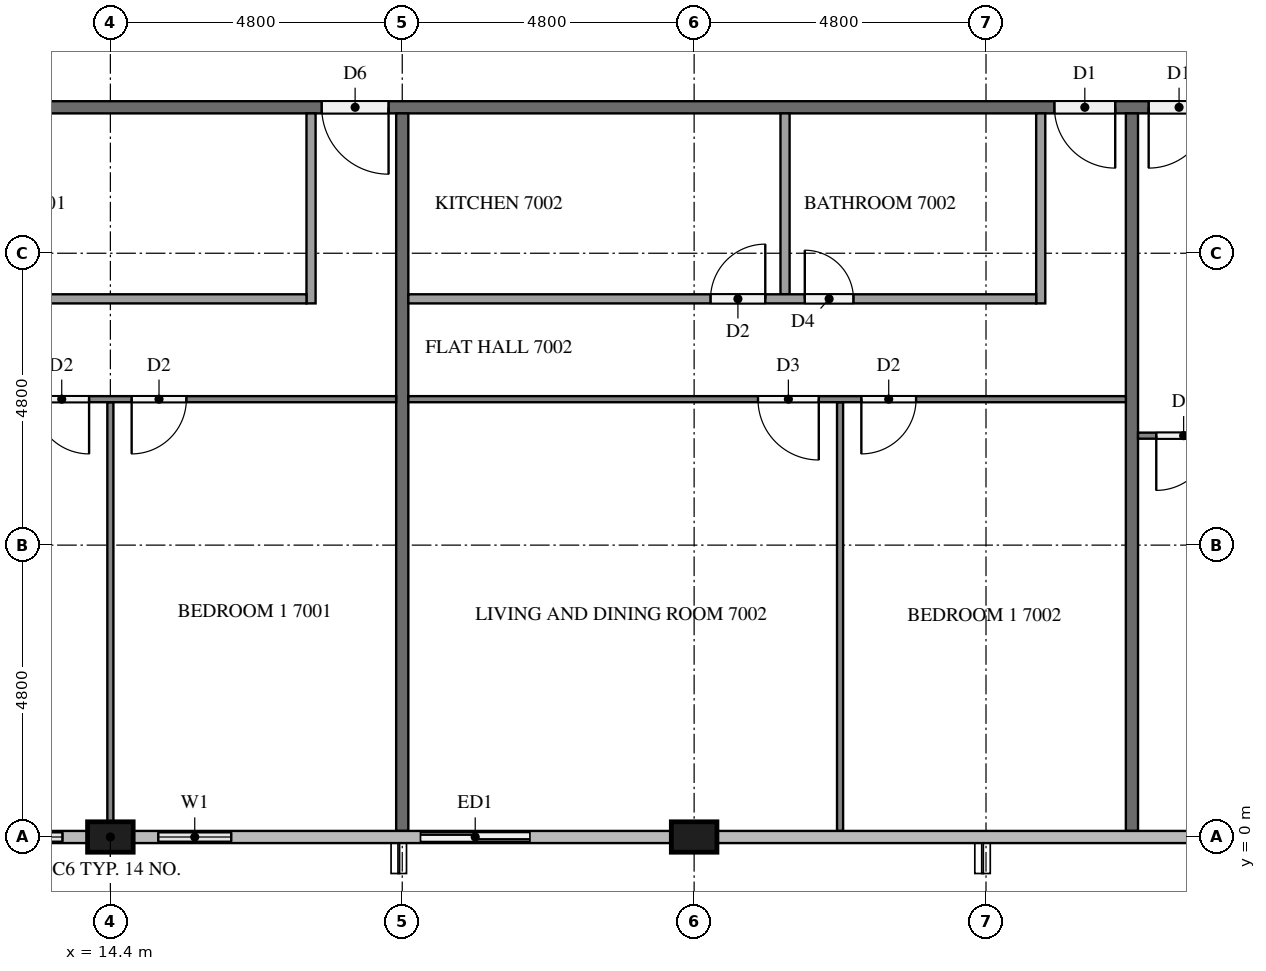
"""IFC4 building model, lengths in metres.
Left out: names, types, materials, properties, quantities, classifications, styles, units other than length and angle.
Written with IfcOpenShell. Run it as: python <this file> out.ifc"""

import sys

from ifc_helpers import new_model, si_unit, direction, frame, frame_2d, origin, origin_2d, place, context, subcontext, project, spatial, rectangle, extrude, element, fill, save


model = new_model("IFC4")
c1 = context("Model", 3, precision=1e-05, world=origin(), true_north=direction((0.0, 1.0)))
c2 = subcontext(c1, "Body", "Model", "MODEL_VIEW")
j1 = project(units=[si_unit("LENGTHUNIT", "METRE"), si_unit("PLANEANGLEUNIT", "RADIAN")], contexts=[c1])
p1 = place(None, origin())
s1 = spatial("IfcSite", under=j1, at=p1, CompositionType="ELEMENT")
p2 = place(p1, origin())
s2 = spatial("IfcBuilding", under=s1, at=p2, CompositionType="ELEMENT")
p3 = place(p2, frame((0.0, 0.0, 268.6)))
s3 = spatial("IfcBuildingStorey", under=s2, at=p3, CompositionType="ELEMENT", Elevation=268.6)
for number, where, z_axis, x_axis in (
    (1, (14.4, 0.0, 0.0), (0.0, 0.0, 1.0), (1.0, 0.0, 0.0)),
    (2, (24.0, 0.0, 0.0), (0.0, 0.0, 1.0), (1.0, 0.0, 0.0)),
):
    element("IfcColumn", number, at=place(p3, frame(where, z_axis=z_axis, x_axis=x_axis)), inside=s3, PredefinedType="COLUMN", context=c2, shape_type="SweptSolid", body=[
        extrude(rectangle(XDim=0.75, YDim=0.5, at=origin_2d()), origin(), (0.0, 0.0, 1.0), 3.2),
    ])
p4 = place(p3, frame((12.0, 0.0, 0.0), z_axis=(0.0, 0.0, 1.0), x_axis=(1.0, 0.0, 0.0)))
e3 = element("IfcWall", 3, at=p4, inside=s3, PredefinedType="SOLIDWALL", context=c2, shape_type="SweptSolid", body=[
    extrude(rectangle(XDim=2.025, YDim=0.15, at=frame_2d((1.012, 0.0))), origin(), (0.0, 0.0, 1.0), 3.2),
])
p5 = place(p4, frame((0.413, 0.0, 0.9)))
e4 = element("IfcOpeningElement", 4, at=p5, cuts=e3, PredefinedType="OPENING", context=c2, shape_type="SweptSolid", body=[
    extrude(rectangle(XDim=1.2, YDim=1.4, at=frame_2d((0.6, 0.7))), frame((0.0, 0.085, 0.0), z_axis=(0.0, -1.0, 0.0), x_axis=(1.0, 0.0, 0.0)), (0.0, 0.0, 1.0), 0.17),
])
p6 = place(p3, frame((14.775, 0.0, 0.0), z_axis=(0.0, 0.0, 1.0), x_axis=(1.0, 0.0, 0.0)))
e5 = element("IfcWall", 5, at=p6, inside=s3, PredefinedType="SOLIDWALL", context=c2, shape_type="SweptSolid", body=[
    extrude(rectangle(XDim=2.025, YDim=0.15, at=frame_2d((1.013, 0.0))), origin(), (0.0, 0.0, 1.0), 3.2),
])
p7 = place(p6, frame((0.413, 0.0, 0.9)))
e6 = element("IfcOpeningElement", 6, at=p7, cuts=e5, PredefinedType="OPENING", context=c2, shape_type="SweptSolid", body=[
    extrude(rectangle(XDim=1.2, YDim=1.4, at=frame_2d((0.6, 0.7))), frame((0.0, 0.085, 0.0), z_axis=(0.0, -1.0, 0.0), x_axis=(1.0, 0.0, 0.0)), (0.0, 0.0, 1.0), 0.17),
])
p8 = place(p3, frame((19.2, 0.0, 0.0), z_axis=(0.0, 0.0, 1.0), x_axis=(1.0, 0.0, 0.0)))
e7 = element("IfcWall", 7, at=p8, inside=s3, PredefinedType="SOLIDWALL", context=c2, shape_type="SweptSolid", body=[
    extrude(rectangle(XDim=2.4, YDim=0.15, at=frame_2d((1.2, 0.0))), origin(), (0.0, 0.0, 1.0), 3.2),
])
p9 = place(p8, frame((0.3, 0.0, 0.0)))
e8 = element("IfcOpeningElement", 8, at=p9, cuts=e7, PredefinedType="OPENING", context=c2, shape_type="SweptSolid", body=[
    extrude(rectangle(XDim=1.8, YDim=2.4, at=frame_2d((0.9, 1.2))), frame((0.0, 0.085, 0.0), z_axis=(0.0, -1.0, 0.0), x_axis=(1.0, 0.0, 0.0)), (0.0, 0.0, 1.0), 0.17),
])
p10 = place(p3, frame((50.5, 12.0, 0.0), z_axis=(0.0, 0.0, 1.0), x_axis=(-1.0, 0.0, 0.0)))
e9 = element("IfcWall", 9, at=p10, inside=s3, PredefinedType="PARTITIONING", context=c2, shape_type="SweptSolid", body=[
    extrude(rectangle(XDim=38.6, YDim=0.2, at=frame_2d((19.3, 0.0))), origin(), (0.0, 0.0, 1.0), 3.2),
])
p11 = place(p10, frame((31.525, 0.0, 0.0)))
e10 = element("IfcOpeningElement", 10, at=p11, cuts=e9, PredefinedType="OPENING", context=c2, shape_type="SweptSolid", body=[
    extrude(rectangle(XDim=1.1, YDim=2.1, at=frame_2d((0.55, 1.05))), frame((0.0, 0.11, 0.0), z_axis=(0.0, -1.0, 0.0), x_axis=(1.0, 0.0, 0.0)), (0.0, 0.0, 1.0), 0.22),
])
p12 = place(p10, frame((19.575, 0.0, 0.0)))
e11 = element("IfcOpeningElement", 11, at=p12, cuts=e9, PredefinedType="OPENING", context=c2, shape_type="SweptSolid", body=[
    extrude(rectangle(XDim=1.0, YDim=2.1, at=frame_2d((0.5, 1.05))), frame((0.0, 0.11, 0.0), z_axis=(0.0, -1.0, 0.0), x_axis=(1.0, 0.0, 0.0)), (0.0, 0.0, 1.0), 0.22),
])
p13 = place(p10, frame((18.025, 0.0, 0.0)))
e12 = element("IfcOpeningElement", 12, at=p13, cuts=e9, PredefinedType="OPENING", context=c2, shape_type="SweptSolid", body=[
    extrude(rectangle(XDim=1.0, YDim=2.1, at=frame_2d((0.5, 1.05))), frame((0.0, 0.11, 0.0), z_axis=(0.0, -1.0, 0.0), x_axis=(1.0, 0.0, 0.0)), (0.0, 0.0, 1.0), 0.22),
])
p14 = place(p10, frame((1.225, 0.0, 0.0)))
e13 = element("IfcOpeningElement", 13, at=p14, cuts=e9, PredefinedType="OPENING", context=c2, shape_type="SweptSolid", body=[
    extrude(rectangle(XDim=1.0, YDim=2.1, at=frame_2d((0.5, 1.05))), frame((0.0, 0.11, 0.0), z_axis=(0.0, -1.0, 0.0), x_axis=(1.0, 0.0, 0.0)), (0.0, 0.0, 1.0), 0.22),
])
for number, where, z_axis, x_axis in (
    (14, (19.2, 11.9, 0.0), (0.0, 0.0, 1.0), (0.0, -1.0, 0.0)),
    (15, (31.2, 11.9, 0.0), (0.0, 0.0, 1.0), (0.0, -1.0, 0.0)),
):
    element("IfcWall", number, at=place(p3, frame(where, z_axis=z_axis, x_axis=x_axis)), inside=s3, PredefinedType="PARTITIONING", context=c2, shape_type="SweptSolid", body=[
        extrude(rectangle(XDim=11.8, YDim=0.2, at=frame_2d((5.9, 0.0))), origin(), (0.0, 0.0, 1.0), 3.2),
    ])
p15 = place(p3, frame((14.4, 7.15, 0.0), z_axis=(0.0, 0.0, 1.0), x_axis=(0.0, -1.0, 0.0)))
e16 = element("IfcWall", 16, at=p15, inside=s3, PredefinedType="PARTITIONING", context=c2, shape_type="SweptSolid", body=[
    extrude(rectangle(XDim=6.9, YDim=0.1, at=frame_2d((3.45, 0.0))), origin(), (0.0, 0.0, 1.0), 3.2),
])
p16 = place(p3, frame((19.1, 7.2, 0.0), z_axis=(0.0, 0.0, 1.0), x_axis=(-1.0, 0.0, 0.0)))
e17 = element("IfcWall", 17, at=p16, inside=s3, PredefinedType="PARTITIONING", context=c2, shape_type="SweptSolid", body=[
    extrude(rectangle(XDim=19.0, YDim=0.1, at=frame_2d((9.5, 0.0))), origin(), (0.0, 0.0, 1.0), 3.2),
])
p17 = place(p16, frame((3.45, 0.0, 0.0)))
e18 = element("IfcOpeningElement", 18, at=p17, cuts=e17, PredefinedType="OPENING", context=c2, shape_type="SweptSolid", body=[
    extrude(rectangle(XDim=0.9, YDim=2.1, at=frame_2d((0.45, 1.05))), frame((0.0, 0.06, 0.0), z_axis=(0.0, -1.0, 0.0), x_axis=(1.0, 0.0, 0.0)), (0.0, 0.0, 1.0), 0.12),
])
p18 = place(p16, frame((5.05, 0.0, 0.0)))
e19 = element("IfcOpeningElement", 19, at=p18, cuts=e17, PredefinedType="OPENING", context=c2, shape_type="SweptSolid", body=[
    extrude(rectangle(XDim=0.9, YDim=2.1, at=frame_2d((0.45, 1.05))), frame((0.0, 0.06, 0.0), z_axis=(0.0, -1.0, 0.0), x_axis=(1.0, 0.0, 0.0)), (0.0, 0.0, 1.0), 0.12),
])
p19 = place(p16, frame((13.05, 0.0, 0.0)))
e20 = element("IfcOpeningElement", 20, at=p19, cuts=e17, PredefinedType="OPENING", context=c2, shape_type="SweptSolid", body=[
    extrude(rectangle(XDim=0.9, YDim=2.1, at=frame_2d((0.45, 1.05))), frame((0.0, 0.06, 0.0), z_axis=(0.0, -1.0, 0.0), x_axis=(1.0, 0.0, 0.0)), (0.0, 0.0, 1.0), 0.12),
])
p20 = place(p16, frame((14.65, 0.0, 0.0)))
e21 = element("IfcOpeningElement", 21, at=p20, cuts=e17, PredefinedType="OPENING", context=c2, shape_type="SweptSolid", body=[
    extrude(rectangle(XDim=1.0, YDim=2.1, at=frame_2d((0.5, 1.05))), frame((0.0, 0.06, 0.0), z_axis=(0.0, -1.0, 0.0), x_axis=(1.0, 0.0, 0.0)), (0.0, 0.0, 1.0), 0.12),
])
p21 = place(p3, frame((17.7, 11.9, 0.0), z_axis=(0.0, 0.0, 1.0), x_axis=(0.0, -1.0, 0.0)))
e22 = element("IfcWall", 22, at=p21, inside=s3, PredefinedType="PARTITIONING", context=c2, shape_type="SweptSolid", body=[
    extrude(rectangle(XDim=3.125, YDim=0.15, at=frame_2d((1.562, 0.0))), origin(), (0.0, 0.0, 1.0), 3.2),
])
p22 = place(p3, frame((0.1, 8.85, 0.0), z_axis=(0.0, 0.0, 1.0), x_axis=(1.0, 0.0, 0.0)))
e23 = element("IfcWall", 23, at=p22, inside=s3, PredefinedType="PARTITIONING", context=c2, shape_type="SweptSolid", body=[
    extrude(rectangle(XDim=17.525, YDim=0.15, at=frame_2d((8.762, 0.0))), origin(), (0.0, 0.0, 1.0), 3.2),
])
p23 = place(p22, frame((11.278, 0.0, 0.0)))
e24 = element("IfcOpeningElement", 24, at=p23, cuts=e23, PredefinedType="OPENING", context=c2, shape_type="SweptSolid", body=[
    extrude(rectangle(XDim=0.9, YDim=2.1, at=frame_2d((0.45, 1.05))), frame((0.0, 0.085, 0.0), z_axis=(0.0, -1.0, 0.0), x_axis=(1.0, 0.0, 0.0)), (0.0, 0.0, 1.0), 0.17),
])
p24 = place(p22, frame((9.828, 0.0, 0.0)))
e25 = element("IfcOpeningElement", 25, at=p24, cuts=e23, PredefinedType="OPENING", context=c2, shape_type="SweptSolid", body=[
    extrude(rectangle(XDim=0.8, YDim=2.1, at=frame_2d((0.4, 1.05))), frame((0.0, 0.085, 0.0), z_axis=(0.0, -1.0, 0.0), x_axis=(1.0, 0.0, 0.0)), (0.0, 0.0, 1.0), 0.17),
])
p25 = place(p22, frame((3.611, 0.0, 0.0)))
e26 = element("IfcOpeningElement", 26, at=p25, cuts=e23, PredefinedType="OPENING", context=c2, shape_type="SweptSolid", body=[
    extrude(rectangle(XDim=0.9, YDim=2.1, at=frame_2d((0.45, 1.05))), frame((0.0, 0.085, 0.0), z_axis=(0.0, -1.0, 0.0), x_axis=(1.0, 0.0, 0.0)), (0.0, 0.0, 1.0), 0.17),
])
p26 = place(p22, frame((2.161, 0.0, 0.0)))
e27 = element("IfcOpeningElement", 27, at=p26, cuts=e23, PredefinedType="OPENING", context=c2, shape_type="SweptSolid", body=[
    extrude(rectangle(XDim=0.8, YDim=2.1, at=frame_2d((0.4, 1.05))), frame((0.0, 0.085, 0.0), z_axis=(0.0, -1.0, 0.0), x_axis=(1.0, 0.0, 0.0)), (0.0, 0.0, 1.0), 0.17),
])
p27 = place(p3, frame((26.4, 7.15, 0.0), z_axis=(0.0, 0.0, 1.0), x_axis=(0.0, -1.0, 0.0)))
e28 = element("IfcWall", 28, at=p27, inside=s3, PredefinedType="PARTITIONING", context=c2, shape_type="SweptSolid", body=[
    extrude(rectangle(XDim=7.05, YDim=0.1, at=frame_2d((3.525, 0.0))), origin(), (0.0, 0.0, 1.0), 3.2),
])
p28 = place(p3, frame((31.1, 7.2, 0.0), z_axis=(0.0, 0.0, 1.0), x_axis=(-1.0, 0.0, 0.0)))
e29 = element("IfcWall", 29, at=p28, inside=s3, PredefinedType="PARTITIONING", context=c2, shape_type="SweptSolid", body=[
    extrude(rectangle(XDim=11.8, YDim=0.1, at=frame_2d((5.9, 0.0))), origin(), (0.0, 0.0, 1.0), 3.2),
])
p29 = place(p28, frame((3.45, 0.0, 0.0)))
e30 = element("IfcOpeningElement", 30, at=p29, cuts=e29, PredefinedType="OPENING", context=c2, shape_type="SweptSolid", body=[
    extrude(rectangle(XDim=0.9, YDim=2.1, at=frame_2d((0.45, 1.05))), frame((0.0, 0.06, 0.0), z_axis=(0.0, -1.0, 0.0), x_axis=(1.0, 0.0, 0.0)), (0.0, 0.0, 1.0), 0.12),
])
p30 = place(p28, frame((5.05, 0.0, 0.0)))
e31 = element("IfcOpeningElement", 31, at=p30, cuts=e29, PredefinedType="OPENING", context=c2, shape_type="SweptSolid", body=[
    extrude(rectangle(XDim=1.0, YDim=2.1, at=frame_2d((0.5, 1.05))), frame((0.0, 0.06, 0.0), z_axis=(0.0, -1.0, 0.0), x_axis=(1.0, 0.0, 0.0)), (0.0, 0.0, 1.0), 0.12),
])
p31 = place(p3, frame((25.495, 11.9, 0.0), z_axis=(0.0, 0.0, 1.0), x_axis=(0.0, -1.0, 0.0)))
e32 = element("IfcWall", 32, at=p31, inside=s3, PredefinedType="PARTITIONING", context=c2, shape_type="SweptSolid", body=[
    extrude(rectangle(XDim=2.975, YDim=0.15, at=frame_2d((1.487, 0.0))), origin(), (0.0, 0.0, 1.0), 3.2),
])
p32 = place(p3, frame((29.7, 11.9, 0.0), z_axis=(0.0, 0.0, 1.0), x_axis=(0.0, -1.0, 0.0)))
e33 = element("IfcWall", 33, at=p32, inside=s3, PredefinedType="PARTITIONING", context=c2, shape_type="SweptSolid", body=[
    extrude(rectangle(XDim=3.125, YDim=0.15, at=frame_2d((1.562, 0.0))), origin(), (0.0, 0.0, 1.0), 3.2),
])
p33 = place(p3, frame((19.3, 8.85, 0.0), z_axis=(0.0, 0.0, 1.0), x_axis=(1.0, 0.0, 0.0)))
e34 = element("IfcWall", 34, at=p33, inside=s3, PredefinedType="PARTITIONING", context=c2, shape_type="SweptSolid", body=[
    extrude(rectangle(XDim=10.325, YDim=0.15, at=frame_2d((5.163, 0.0))), origin(), (0.0, 0.0, 1.0), 3.2),
])
p34 = place(p33, frame((6.52, 0.0, 0.0)))
e35 = element("IfcOpeningElement", 35, at=p34, cuts=e34, PredefinedType="OPENING", context=c2, shape_type="SweptSolid", body=[
    extrude(rectangle(XDim=0.8, YDim=2.1, at=frame_2d((0.4, 1.05))), frame((0.0, 0.085, 0.0), z_axis=(0.0, -1.0, 0.0), x_axis=(1.0, 0.0, 0.0)), (0.0, 0.0, 1.0), 0.17),
])
p35 = place(p33, frame((4.97, 0.0, 0.0)))
e36 = element("IfcOpeningElement", 36, at=p35, cuts=e34, PredefinedType="OPENING", context=c2, shape_type="SweptSolid", body=[
    extrude(rectangle(XDim=0.9, YDim=2.1, at=frame_2d((0.45, 1.05))), frame((0.0, 0.085, 0.0), z_axis=(0.0, -1.0, 0.0), x_axis=(1.0, 0.0, 0.0)), (0.0, 0.0, 1.0), 0.17),
])
p36 = place(p3, frame((47.9, 6.6, 0.0), z_axis=(0.0, 0.0, 1.0), x_axis=(-1.0, 0.0, 0.0)))
e37 = element("IfcWall", 37, at=p36, inside=s3, PredefinedType="PARTITIONING", context=c2, shape_type="SweptSolid", body=[
    extrude(rectangle(XDim=16.6, YDim=0.1, at=frame_2d((8.3, 0.0))), origin(), (0.0, 0.0, 1.0), 3.2),
])
p37 = place(p36, frame((15.4, 0.0, 0.0)))
e38 = element("IfcOpeningElement", 38, at=p37, cuts=e37, PredefinedType="OPENING", context=c2, shape_type="SweptSolid", body=[
    extrude(rectangle(XDim=0.9, YDim=2.1, at=frame_2d((0.45, 1.05))), frame((0.0, 0.06, 0.0), z_axis=(0.0, -1.0, 0.0), x_axis=(1.0, 0.0, 0.0)), (0.0, 0.0, 1.0), 0.12),
])
p38 = place(p36, frame((7.45, 0.0, 0.0)))
e39 = element("IfcOpeningElement", 39, at=p38, cuts=e37, PredefinedType="OPENING", context=c2, shape_type="SweptSolid", body=[
    extrude(rectangle(XDim=0.9, YDim=2.1, at=frame_2d((0.45, 1.05))), frame((0.0, 0.06, 0.0), z_axis=(0.0, -1.0, 0.0), x_axis=(1.0, 0.0, 0.0)), (0.0, 0.0, 1.0), 0.12),
])
p39 = place(p36, frame((5.75, 0.0, 0.0)))
e40 = element("IfcOpeningElement", 40, at=p39, cuts=e37, PredefinedType="OPENING", context=c2, shape_type="SweptSolid", body=[
    extrude(rectangle(XDim=1.0, YDim=2.1, at=frame_2d((0.5, 1.05))), frame((0.0, 0.06, 0.0), z_axis=(0.0, -1.0, 0.0), x_axis=(1.0, 0.0, 0.0)), (0.0, 0.0, 1.0), 0.12),
])
p40 = place(p5, origin())
e41 = element("IfcWindow", 41, at=p40, inside=s3, PartitioningType="SINGLE_PANEL", PredefinedType="WINDOW", context=c2, shape_type="SweptSolid", body=[
    extrude(rectangle(XDim=1.2, YDim=1.4, at=frame_2d((0.6, 0.7))), frame((0.0, 0.03, 0.0), z_axis=(0.0, -1.0, 0.0), x_axis=(1.0, 0.0, 0.0)), (0.0, 0.0, 1.0), 0.06),
])
fill(e4, e41)
p41 = place(p7, origin())
e42 = element("IfcWindow", 42, at=p41, inside=s3, PartitioningType="SINGLE_PANEL", PredefinedType="WINDOW", context=c2, shape_type="SweptSolid", body=[
    extrude(rectangle(XDim=1.2, YDim=1.4, at=frame_2d((0.6, 0.7))), frame((0.0, 0.03, 0.0), z_axis=(0.0, -1.0, 0.0), x_axis=(1.0, 0.0, 0.0)), (0.0, 0.0, 1.0), 0.06),
])
fill(e6, e42)
p42 = place(p9, origin())
e43 = element("IfcDoor", 43, at=p42, inside=s3, OperationType="SLIDING_TO_LEFT", PredefinedType="DOOR", context=c2, shape_type="SweptSolid", body=[
    extrude(rectangle(XDim=1.8, YDim=2.4, at=frame_2d((0.9, 1.2))), frame((0.0, 0.025, 0.0), z_axis=(0.0, -1.0, 0.0), x_axis=(1.0, 0.0, 0.0)), (0.0, 0.0, 1.0), 0.05),
])
fill(e8, e43)
p43 = place(p11, origin())
e44 = element("IfcDoor", 44, at=p43, inside=s3, OperationType="SINGLE_SWING_LEFT", PredefinedType="DOOR", context=c2, shape_type="SweptSolid", body=[
    extrude(rectangle(XDim=1.1, YDim=2.1, at=frame_2d((0.55, 1.05))), frame((0.0, 0.025, 0.0), z_axis=(0.0, -1.0, 0.0), x_axis=(1.0, 0.0, 0.0)), (0.0, 0.0, 1.0), 0.05),
])
fill(e10, e44)
p44 = place(p12, origin())
e45 = element("IfcDoor", 45, at=p44, inside=s3, OperationType="SINGLE_SWING_LEFT", PredefinedType="DOOR", context=c2, shape_type="SweptSolid", body=[
    extrude(rectangle(XDim=1.0, YDim=2.1, at=frame_2d((0.5, 1.05))), frame((0.0, 0.025, 0.0), z_axis=(0.0, -1.0, 0.0), x_axis=(1.0, 0.0, 0.0)), (0.0, 0.0, 1.0), 0.05),
])
fill(e11, e45)
p45 = place(p13, origin())
e46 = element("IfcDoor", 46, at=p45, inside=s3, OperationType="SINGLE_SWING_RIGHT", PredefinedType="DOOR", context=c2, shape_type="SweptSolid", body=[
    extrude(rectangle(XDim=1.0, YDim=2.1, at=frame_2d((0.5, 1.05))), frame((0.0, 0.025, 0.0), z_axis=(0.0, -1.0, 0.0), x_axis=(1.0, 0.0, 0.0)), (0.0, 0.0, 1.0), 0.05),
])
fill(e12, e46)
p46 = place(p17, origin())
e47 = element("IfcDoor", 47, at=p46, inside=s3, OperationType="SINGLE_SWING_RIGHT", PredefinedType="DOOR", context=c2, shape_type="SweptSolid", body=[
    extrude(rectangle(XDim=0.9, YDim=2.1, at=frame_2d((0.45, 1.05))), frame((0.0, 0.025, 0.0), z_axis=(0.0, -1.0, 0.0), x_axis=(1.0, 0.0, 0.0)), (0.0, 0.0, 1.0), 0.05),
])
fill(e18, e47)
p47 = place(p18, origin())
e48 = element("IfcDoor", 48, at=p47, inside=s3, OperationType="SINGLE_SWING_LEFT", PredefinedType="DOOR", context=c2, shape_type="SweptSolid", body=[
    extrude(rectangle(XDim=0.9, YDim=2.1, at=frame_2d((0.45, 1.05))), frame((0.0, 0.025, 0.0), z_axis=(0.0, -1.0, 0.0), x_axis=(1.0, 0.0, 0.0)), (0.0, 0.0, 1.0), 0.05),
])
fill(e19, e48)
p48 = place(p29, origin())
e49 = element("IfcDoor", 49, at=p48, inside=s3, OperationType="SINGLE_SWING_RIGHT", PredefinedType="DOOR", context=c2, shape_type="SweptSolid", body=[
    extrude(rectangle(XDim=0.9, YDim=2.1, at=frame_2d((0.45, 1.05))), frame((0.0, 0.025, 0.0), z_axis=(0.0, -1.0, 0.0), x_axis=(1.0, 0.0, 0.0)), (0.0, 0.0, 1.0), 0.05),
])
fill(e30, e49)
p49 = place(p30, origin())
e50 = element("IfcDoor", 50, at=p49, inside=s3, OperationType="SINGLE_SWING_LEFT", PredefinedType="DOOR", context=c2, shape_type="SweptSolid", body=[
    extrude(rectangle(XDim=1.0, YDim=2.1, at=frame_2d((0.5, 1.05))), frame((0.0, 0.025, 0.0), z_axis=(0.0, -1.0, 0.0), x_axis=(1.0, 0.0, 0.0)), (0.0, 0.0, 1.0), 0.05),
])
fill(e31, e50)
p50 = place(p34, origin())
e51 = element("IfcDoor", 51, at=p50, inside=s3, OperationType="SINGLE_SWING_LEFT", PredefinedType="DOOR", context=c2, shape_type="SweptSolid", body=[
    extrude(rectangle(XDim=0.8, YDim=2.1, at=frame_2d((0.4, 1.05))), frame((0.0, 0.025, 0.0), z_axis=(0.0, -1.0, 0.0), x_axis=(1.0, 0.0, 0.0)), (0.0, 0.0, 1.0), 0.05),
])
fill(e35, e51)
p51 = place(p35, origin())
e52 = element("IfcDoor", 52, at=p51, inside=s3, OperationType="SINGLE_SWING_RIGHT", PredefinedType="DOOR", context=c2, shape_type="SweptSolid", body=[
    extrude(rectangle(XDim=0.9, YDim=2.1, at=frame_2d((0.45, 1.05))), frame((0.0, 0.025, 0.0), z_axis=(0.0, -1.0, 0.0), x_axis=(1.0, 0.0, 0.0)), (0.0, 0.0, 1.0), 0.05),
])
fill(e36, e52)
p52 = place(p37, origin())
e53 = element("IfcDoor", 53, at=p52, inside=s3, OperationType="SINGLE_SWING_RIGHT", PredefinedType="DOOR", context=c2, shape_type="SweptSolid", body=[
    extrude(rectangle(XDim=0.9, YDim=2.1, at=frame_2d((0.45, 1.05))), frame((0.0, 0.025, 0.0), z_axis=(0.0, -1.0, 0.0), x_axis=(1.0, 0.0, 0.0)), (0.0, 0.0, 1.0), 0.05),
])
fill(e38, e53)
save(model, sys.argv[1])
